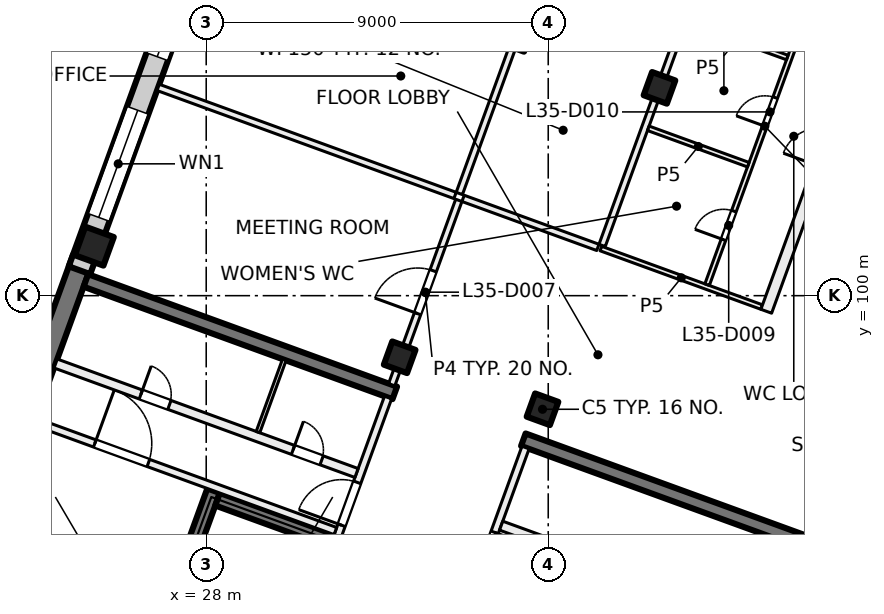
"""IFC4 building model, lengths in metres.
Left out: names, types, materials, properties, quantities, classifications, styles, units other than length and angle.
Written with IfcOpenShell. Run it as: python <this file> out.ifc"""

import sys

from ifc_helpers import new_model, si_unit, direction, frame, frame_2d, origin, origin_2d, place, context, subcontext, project, spatial, rectangle, extrude, element, fill, save


model = new_model("IFC4")
c1 = context("Model", 3, precision=1e-05, world=origin(), true_north=direction((0.0, 1.0)))
c2 = subcontext(c1, "Body", "Model", "MODEL_VIEW")
j1 = project(units=[si_unit("LENGTHUNIT", "METRE"), si_unit("PLANEANGLEUNIT", "RADIAN")], contexts=[c1])
p1 = place(None, origin())
s1 = spatial("IfcSite", under=j1, at=p1, CompositionType="ELEMENT")
p2 = place(p1, origin())
s2 = spatial("IfcBuilding", under=s1, at=p2, CompositionType="ELEMENT")
p3 = place(p2, frame((0.0, 0.0, 150.5)))
s3 = spatial("IfcBuildingStorey", under=s2, at=p3, CompositionType="ELEMENT", Elevation=150.5)
for number, where, z_axis, x_axis in (
    (1, (39.927, 105.468, 0.0), (0.0, 0.0, 1.0), (-0.342, -0.94, 0.0)),
    (2, (36.849, 97.011, 0.0), (0.0, 0.0, 1.0), (-0.342, -0.94, 0.0)),
    (3, (33.091, 98.379, 0.0), (0.0, 0.0, 1.0), (-0.342, -0.94, 0.0)),
):
    element("IfcColumn", number, at=place(p3, frame(where, z_axis=z_axis, x_axis=x_axis)), inside=s3, PredefinedType="COLUMN", context=c2, shape_type="SweptSolid", body=[
        extrude(rectangle(XDim=0.65, YDim=0.65, at=origin_2d()), origin(), (0.0, 0.0, 1.0), 4.0),
    ])
p4 = place(p3, frame((25.056, 101.303, 0.0), z_axis=(0.0, 0.0, 1.0), x_axis=(-0.342020143326, -0.939692620786, 0.0)))
e4 = element("IfcColumn", 4, at=p4, inside=s3, PredefinedType="COLUMN", context=c2, shape_type="SweptSolid", body=[
    extrude(rectangle(XDim=0.8, YDim=0.8, at=origin_2d()), origin(), (0.0, 0.0, 1.0), 4.0),
])
p5 = place(p3, frame((41.85, 85.241, 0.0), z_axis=(0.0, 0.0, 1.0), x_axis=(0.34201902012, 0.939693029598, 0.0)))
e5 = element("IfcWall", 5, at=p5, inside=s3, PredefinedType="SHEAR", context=c2, shape_type="SweptSolid", body=[
    extrude(rectangle(XDim=8.95, YDim=0.55, at=frame_2d((4.475, 0.0))), origin(), (0.0, 0.0, 1.0), 4.0),
])
p6 = place(p3, frame((21.694, 92.577, 0.0), z_axis=(0.0, 0.0, 1.0), x_axis=(0.342010253184, 0.939696220444, 0.0)))
e6 = element("IfcWall", 6, at=p6, inside=s3, PredefinedType="SHEAR", context=c2, shape_type="SweptSolid", body=[
    extrude(rectangle(XDim=8.95, YDim=0.55, at=frame_2d((4.475, 0.0))), origin(), (0.0, 0.0, 1.0), 4.0),
])
p7 = place(p3, frame((27.208, 82.216, 0.0), z_axis=(0.0, 0.0, 1.0), x_axis=(0.34201563943, 0.939694260058, 0.0)))
e7 = element("IfcWall", 7, at=p7, inside=s3, PredefinedType="SHEAR", context=c2, shape_type="SweptSolid", body=[
    extrude(rectangle(XDim=12.225, YDim=0.35, at=frame_2d((6.113, 0.0))), origin(), (0.0, 0.0, 1.0), 4.0),
])
p8 = place(p7, frame((0.7, 0.0, 0.0)))
e8 = element("IfcOpeningElement", 8, at=p8, cuts=e7, PredefinedType="OPENING", context=c2, shape_type="SweptSolid", body=[
    extrude(rectangle(XDim=1.1, YDim=2.1, at=frame_2d((0.55, 1.05))), frame((0.0, 0.185, 0.0), z_axis=(0.0, -1.0, 0.0), x_axis=(1.0, 0.0, 0.0)), (0.0, 0.0, 1.0), 0.37),
])
p9 = place(p7, frame((3.1, 0.0, 0.0)))
e9 = element("IfcOpeningElement", 9, at=p9, cuts=e7, PredefinedType="OPENING", context=c2, shape_type="SweptSolid", body=[
    extrude(rectangle(XDim=1.1, YDim=2.1, at=frame_2d((0.55, 1.05))), frame((0.0, 0.185, 0.0), z_axis=(0.0, -1.0, 0.0), x_axis=(1.0, 0.0, 0.0)), (0.0, 0.0, 1.0), 0.37),
])
p10 = place(p7, frame((5.5, 0.0, 0.0)))
e10 = element("IfcOpeningElement", 10, at=p10, cuts=e7, PredefinedType="OPENING", context=c2, shape_type="SweptSolid", body=[
    extrude(rectangle(XDim=1.1, YDim=2.1, at=frame_2d((0.55, 1.05))), frame((0.0, 0.185, 0.0), z_axis=(0.0, -1.0, 0.0), x_axis=(1.0, 0.0, 0.0)), (0.0, 0.0, 1.0), 0.37),
])
p11 = place(p7, frame((10.3, 0.0, 0.0)))
e11 = element("IfcOpeningElement", 11, at=p11, cuts=e7, PredefinedType="OPENING", context=c2, shape_type="SweptSolid", body=[
    extrude(rectangle(XDim=1.1, YDim=2.1, at=frame_2d((0.55, 1.05))), frame((0.0, 0.185, 0.0), z_axis=(0.0, -1.0, 0.0), x_axis=(1.0, 0.0, 0.0)), (0.0, 0.0, 1.0), 0.37),
])
p12 = place(p3, frame((24.013, 83.379, 0.0), z_axis=(0.0, 0.0, 1.0), x_axis=(0.34201563943, 0.939694260058, 0.0)))
e12 = element("IfcWall", 12, at=p12, inside=s3, PredefinedType="SHEAR", context=c2, shape_type="SweptSolid", body=[
    extrude(rectangle(XDim=12.225, YDim=0.35, at=frame_2d((6.113, 0.0))), origin(), (0.0, 0.0, 1.0), 4.0),
])
p13 = place(p12, frame((7.95, 0.0, 0.0)))
e13 = element("IfcOpeningElement", 13, at=p13, cuts=e12, PredefinedType="OPENING", context=c2, shape_type="SweptSolid", body=[
    extrude(rectangle(XDim=1.1, YDim=2.1, at=frame_2d((0.55, 1.05))), frame((0.0, 0.185, 0.0), z_axis=(0.0, -1.0, 0.0), x_axis=(1.0, 0.0, 0.0)), (0.0, 0.0, 1.0), 0.37),
])
p14 = place(p3, frame((31.165, 93.599, 0.0), z_axis=(0.0, 0.0, 1.0), x_axis=(-0.939683528043, 0.3420451244, 0.0)))
e14 = element("IfcWall", 14, at=p14, inside=s3, PredefinedType="SHEAR", context=c2, shape_type="SweptSolid", body=[
    extrude(rectangle(XDim=3.05, YDim=0.35, at=frame_2d((1.525, 0.0))), origin(), (0.0, 0.0, 1.0), 4.0),
])
p15 = place(p3, frame((44.473, 93.251, 0.0), z_axis=(0.0, 0.0, 1.0), x_axis=(-0.939692847377, 0.34201952077, 0.0)))
e15 = element("IfcWall", 15, at=p15, inside=s3, PredefinedType="SHEAR", context=c2, shape_type="SweptSolid", body=[
    extrude(rectangle(XDim=8.65, YDim=0.35, at=frame_2d((4.325, 0.0))), origin(), (0.0, 0.0, 1.0), 4.0),
])
p16 = place(p3, frame((32.962, 97.441, 0.0), z_axis=(0.0, 0.0, 1.0), x_axis=(-0.939689545667, 0.342028592028, 0.0)))
e16 = element("IfcWall", 16, at=p16, inside=s3, PredefinedType="SHEAR", context=c2, shape_type="SweptSolid", body=[
    extrude(rectangle(XDim=8.65, YDim=0.35, at=frame_2d((4.325, 0.0))), origin(), (0.0, 0.0, 1.0), 4.0),
])
p17 = place(p3, frame((24.666, 100.669, 0.0), z_axis=(0.0, 0.0, 1.0), x_axis=(0.34201964167, 0.939692803373, 0.0)))
e17 = element("IfcWall", 17, at=p17, inside=s3, PredefinedType="SOLIDWALL", context=c2, shape_type="SweptSolid", body=[
    extrude(rectangle(XDim=32.884, YDim=0.6, at=frame_2d((16.442, 0.0))), origin(), (0.0, 0.0, 1.0), 3.625),
])
p18 = place(p17, frame((1.48, 0.0, 0.9)))
e18 = element("IfcOpeningElement", 18, at=p18, cuts=e17, PredefinedType="OPENING", context=c2, shape_type="SweptSolid", body=[
    extrude(rectangle(XDim=3.0, YDim=2.4, at=frame_2d((1.5, 1.2))), frame((0.0, 0.31, 0.0), z_axis=(0.0, -1.0, 0.0), x_axis=(1.0, 0.0, 0.0)), (0.0, 0.0, 1.0), 0.62),
])
p19 = place(p17, frame((5.98, 0.0, 0.9)))
e19 = element("IfcOpeningElement", 19, at=p19, cuts=e17, PredefinedType="OPENING", context=c2, shape_type="SweptSolid", body=[
    extrude(rectangle(XDim=3.0, YDim=2.4, at=frame_2d((1.5, 1.2))), frame((0.0, 0.31, 0.0), z_axis=(0.0, -1.0, 0.0), x_axis=(1.0, 0.0, 0.0)), (0.0, 0.0, 1.0), 0.62),
])
p20 = place(p17, frame((10.48, 0.0, 0.9)))
e20 = element("IfcOpeningElement", 20, at=p20, cuts=e17, PredefinedType="OPENING", context=c2, shape_type="SweptSolid", body=[
    extrude(rectangle(XDim=3.0, YDim=2.4, at=frame_2d((1.5, 1.2))), frame((0.0, 0.31, 0.0), z_axis=(0.0, -1.0, 0.0), x_axis=(1.0, 0.0, 0.0)), (0.0, 0.0, 1.0), 0.62),
])
p21 = place(p17, frame((14.98, 0.0, 0.9)))
e21 = element("IfcOpeningElement", 21, at=p21, cuts=e17, PredefinedType="OPENING", context=c2, shape_type="SweptSolid", body=[
    extrude(rectangle(XDim=3.0, YDim=2.4, at=frame_2d((1.5, 1.2))), frame((0.0, 0.31, 0.0), z_axis=(0.0, -1.0, 0.0), x_axis=(1.0, 0.0, 0.0)), (0.0, 0.0, 1.0), 0.62),
])
p22 = place(p17, frame((19.48, 0.0, 0.9)))
e22 = element("IfcOpeningElement", 22, at=p22, cuts=e17, PredefinedType="OPENING", context=c2, shape_type="SweptSolid", body=[
    extrude(rectangle(XDim=3.0, YDim=2.4, at=frame_2d((1.5, 1.2))), frame((0.0, 0.31, 0.0), z_axis=(0.0, -1.0, 0.0), x_axis=(1.0, 0.0, 0.0)), (0.0, 0.0, 1.0), 0.62),
])
p23 = place(p17, frame((23.98, 0.0, 0.9)))
e23 = element("IfcOpeningElement", 23, at=p23, cuts=e17, PredefinedType="OPENING", context=c2, shape_type="SweptSolid", body=[
    extrude(rectangle(XDim=3.0, YDim=2.4, at=frame_2d((1.5, 1.2))), frame((0.0, 0.31, 0.0), z_axis=(0.0, -1.0, 0.0), x_axis=(1.0, 0.0, 0.0)), (0.0, 0.0, 1.0), 0.62),
])
p24 = place(p17, frame((28.48, 0.0, 0.9)))
e24 = element("IfcOpeningElement", 24, at=p24, cuts=e17, PredefinedType="OPENING", context=c2, shape_type="SweptSolid", body=[
    extrude(rectangle(XDim=3.0, YDim=2.4, at=frame_2d((1.5, 1.2))), frame((0.0, 0.31, 0.0), z_axis=(0.0, -1.0, 0.0), x_axis=(1.0, 0.0, 0.0)), (0.0, 0.0, 1.0), 0.62),
])
p25 = place(p3, frame((31.459, 93.678, 0.0), z_axis=(0.0, 0.0, 1.0), x_axis=(0.341985870128, 0.939705094502, 0.0)))
e25 = element("IfcWall", 25, at=p25, inside=s3, PredefinedType="PARTITIONING", context=c2, shape_type="SweptSolid", body=[
    extrude(rectangle(XDim=3.875, YDim=0.2, at=frame_2d((1.938, 0.0))), origin(), (0.0, 0.0, 1.0), 3.625),
])
p26 = place(p25, frame((0.3, 0.0, 0.0)))
e26 = element("IfcOpeningElement", 26, at=p26, cuts=e25, PredefinedType="OPENING", context=c2, shape_type="SweptSolid", body=[
    extrude(rectangle(XDim=1.2, YDim=2.1, at=frame_2d((0.6, 1.05))), frame((0.0, 0.11, 0.0), z_axis=(0.0, -1.0, 0.0), x_axis=(1.0, 0.0, 0.0)), (0.0, 0.0, 1.0), 0.22),
])
p27 = place(p3, frame((23.483, 96.688, 0.0), z_axis=(0.0, 0.0, 1.0), x_axis=(0.939691007314, -0.342024576271, 0.0)))
e27 = element("IfcWall", 27, at=p27, inside=s3, PredefinedType="PARTITIONING", context=c2, shape_type="SweptSolid", body=[
    extrude(rectangle(XDim=8.425, YDim=0.2, at=frame_2d((4.212, 0.0))), origin(), (0.0, 0.0, 1.0), 3.625),
])
p28 = place(p27, frame((1.688, 0.0, 0.0)))
e28 = element("IfcOpeningElement", 28, at=p28, cuts=e27, PredefinedType="OPENING", context=c2, shape_type="SweptSolid", body=[
    extrude(rectangle(XDim=1.5, YDim=2.1, at=frame_2d((0.75, 1.05))), frame((0.0, 0.11, 0.0), z_axis=(0.0, -1.0, 0.0), x_axis=(1.0, 0.0, 0.0)), (0.0, 0.0, 1.0), 0.22),
])
p29 = place(p3, frame((24.039, 98.215, 0.0), z_axis=(0.0, 0.0, 1.0), x_axis=(0.939687617333, -0.342033889887, 0.0)))
e29 = element("IfcWall", 29, at=p29, inside=s3, PredefinedType="PARTITIONING", context=c2, shape_type="SweptSolid", body=[
    extrude(rectangle(XDim=8.425, YDim=0.25, at=frame_2d((4.212, 0.0))), origin(), (0.0, 0.0, 1.0), 3.625),
])
p30 = place(p29, frame((6.647, 0.0, 0.0)))
e30 = element("IfcOpeningElement", 30, at=p30, cuts=e29, PredefinedType="OPENING", context=c2, shape_type="SweptSolid", body=[
    extrude(rectangle(XDim=0.8, YDim=2.1, at=frame_2d((0.4, 1.05))), frame((0.0, 0.135, 0.0), z_axis=(0.0, -1.0, 0.0), x_axis=(1.0, 0.0, 0.0)), (0.0, 0.0, 1.0), 0.27),
])
p31 = place(p29, frame((2.385, 0.0, 0.0)))
e31 = element("IfcOpeningElement", 31, at=p31, cuts=e29, PredefinedType="OPENING", context=c2, shape_type="SweptSolid", body=[
    extrude(rectangle(XDim=0.8, YDim=2.1, at=frame_2d((0.4, 1.05))), frame((0.0, 0.135, 0.0), z_axis=(0.0, -1.0, 0.0), x_axis=(1.0, 0.0, 0.0)), (0.0, 0.0, 1.0), 0.27),
])
p32 = place(p3, frame((29.362, 96.41, 0.0), z_axis=(0.0, 0.0, 1.0), x_axis=(0.342043138314, 0.939684250976, 0.0)))
e32 = element("IfcWall", 32, at=p32, inside=s3, PredefinedType="PARTITIONING", context=c2, shape_type="SweptSolid", body=[
    extrude(rectangle(XDim=2.025, YDim=0.1, at=frame_2d((1.012, 0.0))), origin(), (0.0, 0.0, 1.0), 3.625),
])
p33 = place(p3, frame((36.403, 96.003, 0.0), z_axis=(0.0, 0.0, 1.0), x_axis=(-0.342041503764, -0.939684845947, 0.0)))
e33 = element("IfcWall", 33, at=p33, inside=s3, PredefinedType="PARTITIONING", context=c2, shape_type="SweptSolid", body=[
    extrude(rectangle(XDim=3.875, YDim=0.2, at=frame_2d((1.938, 0.0))), origin(), (0.0, 0.0, 1.0), 3.625),
])
p34 = place(p33, frame((2.375, 0.0, 0.0)))
e34 = element("IfcOpeningElement", 34, at=p34, cuts=e33, PredefinedType="OPENING", context=c2, shape_type="SweptSolid", body=[
    extrude(rectangle(XDim=1.2, YDim=2.1, at=frame_2d((0.6, 1.05))), frame((0.0, 0.11, 0.0), z_axis=(0.0, -1.0, 0.0), x_axis=(1.0, 0.0, 0.0)), (0.0, 0.0, 1.0), 0.22),
])
p35 = place(p3, frame((35.761, 93.948, 0.0), z_axis=(0.0, 0.0, 1.0), x_axis=(0.93969693093, -0.342008301071, 0.0)))
e35 = element("IfcWall", 35, at=p35, inside=s3, PredefinedType="PARTITIONING", context=c2, shape_type="SweptSolid", body=[
    extrude(rectangle(XDim=8.425, YDim=0.25, at=frame_2d((4.212, 0.0))), origin(), (0.0, 0.0, 1.0), 3.625),
])
p36 = place(p35, frame((3.712, 0.0, 0.0)))
e36 = element("IfcOpeningElement", 36, at=p36, cuts=e35, PredefinedType="OPENING", context=c2, shape_type="SweptSolid", body=[
    extrude(rectangle(XDim=1.0, YDim=2.1, at=frame_2d((0.5, 1.05))), frame((0.0, 0.135, 0.0), z_axis=(0.0, -1.0, 0.0), x_axis=(1.0, 0.0, 0.0)), (0.0, 0.0, 1.0), 0.27),
])
p37 = place(p3, frame((26.736, 105.48, 0.0), z_axis=(0.0, 0.0, 1.0), x_axis=(0.939705074886, -0.341985924028, 0.0)))
e37 = element("IfcWall", 37, at=p37, inside=s3, PredefinedType="PARTITIONING", context=c2, shape_type="SweptSolid", body=[
    extrude(rectangle(XDim=8.313, YDim=0.175, at=frame_2d((4.157, 0.0))), origin(), (0.0, 0.0, 1.0), 3.625),
])
p38 = place(p3, frame((32.881, 97.657, 0.0), z_axis=(0.0, 0.0, 1.0), x_axis=(0.342058204353, 0.939678766832, 0.0)))
e38 = element("IfcWall", 38, at=p38, inside=s3, PredefinedType="PARTITIONING", context=c2, shape_type="SweptSolid", body=[
    extrude(rectangle(XDim=5.163, YDim=0.175, at=frame_2d((2.581, 0.0))), origin(), (0.0, 0.0, 1.0), 3.625),
])
p39 = place(p38, frame((1.991, 0.0, 0.0)))
e39 = element("IfcOpeningElement", 39, at=p39, cuts=e38, PredefinedType="OPENING", context=c2, shape_type="SweptSolid", body=[
    extrude(rectangle(XDim=1.2, YDim=2.1, at=frame_2d((0.6, 1.05))), frame((0.0, 0.097, 0.0), z_axis=(0.0, -1.0, 0.0), x_axis=(1.0, 0.0, 0.0)), (0.0, 0.0, 1.0), 0.195),
])
p40 = place(p3, frame((34.759, 102.56, 0.0), z_axis=(0.0, 0.0, 1.0), x_axis=(0.939770757411, -0.341805388365, 0.0)))
e40 = element("IfcWall", 40, at=p40, inside=s3, PredefinedType="PARTITIONING", context=c2, shape_type="SweptSolid", body=[
    extrude(rectangle(XDim=3.774, YDim=0.175, at=frame_2d((1.887, 0.0))), origin(), (0.0, 0.0, 1.0), 3.625),
])
p41 = place(p3, frame((34.66, 102.689, 0.0), z_axis=(0.0, 0.0, 1.0), x_axis=(0.341951828534, 0.939717482524, 0.0)))
e41 = element("IfcWall", 41, at=p41, inside=s3, PredefinedType="PARTITIONING", context=c2, shape_type="SweptSolid", body=[
    extrude(rectangle(XDim=8.826, YDim=0.175, at=frame_2d((4.413, 0.0))), origin(), (0.0, 0.0, 1.0), 3.625),
])
p42 = place(p41, frame((4.813, 0.0, 0.0)))
e42 = element("IfcOpeningElement", 42, at=p42, cuts=e41, PredefinedType="OPENING", context=c2, shape_type="SweptSolid", body=[
    extrude(rectangle(XDim=1.2, YDim=2.1, at=frame_2d((0.6, 1.05))), frame((0.0, 0.097, 0.0), z_axis=(0.0, -1.0, 0.0), x_axis=(1.0, 0.0, 0.0)), (0.0, 0.0, 1.0), 0.195),
])
p43 = place(p3, frame((38.385, 101.24, 0.0), z_axis=(0.0, 0.0, 1.0), x_axis=(0.939711088937, -0.341969398235, 0.0)))
e43 = element("IfcWall", 43, at=p43, inside=s3, PredefinedType="PARTITIONING", context=c2, shape_type="SweptSolid", body=[
    extrude(rectangle(XDim=4.503, YDim=0.125, at=frame_2d((2.252, 0.0))), origin(), (0.0, 0.0, 1.0), 3.625),
])
p44 = place(p3, frame((38.418, 101.322, 0.0), z_axis=(0.0, 0.0, 1.0), x_axis=(0.342101536507, 0.939662992099, 0.0)))
e44 = element("IfcWall", 44, at=p44, inside=s3, PredefinedType="PARTITIONING", context=c2, shape_type="SweptSolid", body=[
    extrude(rectangle(XDim=8.913, YDim=0.175, at=frame_2d((4.457, 0.0))), origin(), (0.0, 0.0, 1.0), 3.625),
])
p45 = place(p3, frame((41.181, 100.29, 0.0), z_axis=(0.0, 0.0, 1.0), x_axis=(0.34222012082, 0.939619810831, 0.0)))
e45 = element("IfcWall", 45, at=p45, inside=s3, PredefinedType="PARTITIONING", context=c2, shape_type="SweptSolid", body=[
    extrude(rectangle(XDim=8.875, YDim=0.125, at=frame_2d((4.438, 0.0))), origin(), (0.0, 0.0, 1.0), 3.625),
])
p46 = place(p45, frame((1.258, 0.0, 0.0)))
e46 = element("IfcOpeningElement", 46, at=p46, cuts=e45, PredefinedType="OPENING", context=c2, shape_type="SweptSolid", body=[
    extrude(rectangle(XDim=0.8, YDim=2.1, at=frame_2d((0.4, 1.05))), frame((0.0, 0.073, 0.0), z_axis=(0.0, -1.0, 0.0), x_axis=(1.0, 0.0, 0.0)), (0.0, 0.0, 1.0), 0.145),
])
p47 = place(p45, frame((4.437, 0.0, 0.0)))
e47 = element("IfcOpeningElement", 47, at=p47, cuts=e45, PredefinedType="OPENING", context=c2, shape_type="SweptSolid", body=[
    extrude(rectangle(XDim=0.8, YDim=2.1, at=frame_2d((0.4, 1.05))), frame((0.0, 0.073, 0.0), z_axis=(0.0, -1.0, 0.0), x_axis=(1.0, 0.0, 0.0)), (0.0, 0.0, 1.0), 0.145),
])
p48 = place(p45, frame((7.116, 0.0, 0.0)))
e48 = element("IfcOpeningElement", 48, at=p48, cuts=e45, PredefinedType="OPENING", context=c2, shape_type="SweptSolid", body=[
    extrude(rectangle(XDim=1.0, YDim=2.1, at=frame_2d((0.5, 1.05))), frame((0.0, 0.073, 0.0), z_axis=(0.0, -1.0, 0.0), x_axis=(1.0, 0.0, 0.0)), (0.0, 0.0, 1.0), 0.145),
])
p49 = place(p3, frame((42.264, 103.446, 0.0), z_axis=(0.0, 0.0, 1.0), x_axis=(-0.939640574808, 0.342163104635, 0.0)))
e49 = element("IfcWall", 49, at=p49, inside=s3, PredefinedType="PARTITIONING", context=c2, shape_type="SweptSolid", body=[
    extrude(rectangle(XDim=2.8, YDim=0.125, at=frame_2d((1.4, 0.0))), origin(), (0.0, 0.0, 1.0), 3.625),
])
p50 = place(p3, frame((42.737, 99.59, 0.0), z_axis=(0.0, 0.0, 1.0), x_axis=(0.341992703977, 0.939702607438, 0.0)))
e50 = element("IfcWall", 50, at=p50, inside=s3, PredefinedType="PARTITIONING", context=c2, shape_type="SweptSolid", body=[
    extrude(rectangle(XDim=23.006, YDim=0.3, at=frame_2d((11.503, 0.0))), origin(), (0.0, 0.0, 1.0), 3.625),
])
p51 = place(p50, frame((4.062, 0.0, 0.0)))
e51 = element("IfcOpeningElement", 51, at=p51, cuts=e50, PredefinedType="OPENING", context=c2, shape_type="SweptSolid", body=[
    extrude(rectangle(XDim=1.0, YDim=2.1, at=frame_2d((0.5, 1.05))), frame((0.0, 0.16, 0.0), z_axis=(0.0, -1.0, 0.0), x_axis=(1.0, 0.0, 0.0)), (0.0, 0.0, 1.0), 0.32),
])
p52 = place(p50, frame((10.162, 0.0, 0.0)))
e52 = element("IfcOpeningElement", 52, at=p52, cuts=e50, PredefinedType="OPENING", context=c2, shape_type="SweptSolid", body=[
    extrude(rectangle(XDim=0.8, YDim=2.1, at=frame_2d((0.4, 1.05))), frame((0.0, 0.16, 0.0), z_axis=(0.0, -1.0, 0.0), x_axis=(1.0, 0.0, 0.0)), (0.0, 0.0, 1.0), 0.32),
])
p53 = place(p50, frame((13.712, 0.0, 0.0)))
e53 = element("IfcOpeningElement", 53, at=p53, cuts=e50, PredefinedType="OPENING", context=c2, shape_type="SweptSolid", body=[
    extrude(rectangle(XDim=1.2, YDim=2.1, at=frame_2d((0.6, 1.05))), frame((0.0, 0.16, 0.0), z_axis=(0.0, -1.0, 0.0), x_axis=(1.0, 0.0, 0.0)), (0.0, 0.0, 1.0), 0.32),
])
p54 = place(p50, frame((18.662, 0.0, 0.0)))
e54 = element("IfcOpeningElement", 54, at=p54, cuts=e50, PredefinedType="OPENING", context=c2, shape_type="SweptSolid", body=[
    extrude(rectangle(XDim=1.8, YDim=2.1, at=frame_2d((0.9, 1.05))), frame((0.0, 0.16, 0.0), z_axis=(0.0, -1.0, 0.0), x_axis=(1.0, 0.0, 0.0)), (0.0, 0.0, 1.0), 0.32),
])
p55 = place(p3, frame((43.29, 106.266, 0.0), z_axis=(0.0, 0.0, 1.0), x_axis=(-0.939650782256, 0.342135071873, 0.0)))
e55 = element("IfcWall", 55, at=p55, inside=s3, PredefinedType="PARTITIONING", context=c2, shape_type="SweptSolid", body=[
    extrude(rectangle(XDim=2.8, YDim=0.125, at=frame_2d((1.4, 0.0))), origin(), (0.0, 0.0, 1.0), 3.625),
])
p56 = place(p18, origin())
e56 = element("IfcWindow", 56, at=p56, inside=s3, PartitioningType="SINGLE_PANEL", PredefinedType="WINDOW", context=c2, shape_type="SweptSolid", body=[
    extrude(rectangle(XDim=3.0, YDim=2.4, at=frame_2d((1.5, 1.2))), frame((0.0, 0.03, 0.0), z_axis=(0.0, -1.0, 0.0), x_axis=(1.0, 0.0, 0.0)), (0.0, 0.0, 1.0), 0.06),
])
fill(e18, e56)
p57 = place(p19, origin())
e57 = element("IfcWindow", 57, at=p57, inside=s3, PartitioningType="SINGLE_PANEL", PredefinedType="WINDOW", context=c2, shape_type="SweptSolid", body=[
    extrude(rectangle(XDim=3.0, YDim=2.4, at=frame_2d((1.5, 1.2))), frame((0.0, 0.03, 0.0), z_axis=(0.0, -1.0, 0.0), x_axis=(1.0, 0.0, 0.0)), (0.0, 0.0, 1.0), 0.06),
])
fill(e19, e57)
p58 = place(p26, origin())
e58 = element("IfcDoor", 58, at=p58, inside=s3, OperationType="DOUBLE_DOOR_SINGLE_SWING", PredefinedType="DOOR", context=c2, shape_type="SweptSolid", body=[
    extrude(rectangle(XDim=1.2, YDim=2.1, at=frame_2d((0.6, 1.05))), frame((0.0, 0.025, 0.0), z_axis=(0.0, -1.0, 0.0), x_axis=(1.0, 0.0, 0.0)), (0.0, 0.0, 1.0), 0.05),
])
fill(e26, e58)
p59 = place(p28, origin())
e59 = element("IfcDoor", 59, at=p59, inside=s3, OperationType="DOUBLE_DOOR_SINGLE_SWING", PredefinedType="DOOR", context=c2, shape_type="SweptSolid", body=[
    extrude(rectangle(XDim=1.5, YDim=2.1, at=frame_2d((0.75, 1.05))), frame((0.0, 0.025, 0.0), z_axis=(0.0, -1.0, 0.0), x_axis=(1.0, 0.0, 0.0)), (0.0, 0.0, 1.0), 0.05),
])
fill(e28, e59)
p60 = place(p30, origin())
e60 = element("IfcDoor", 60, at=p60, inside=s3, OperationType="SINGLE_SWING_LEFT", PredefinedType="DOOR", context=c2, shape_type="SweptSolid", body=[
    extrude(rectangle(XDim=0.8, YDim=2.1, at=frame_2d((0.4, 1.05))), frame((0.0, 0.025, 0.0), z_axis=(0.0, -1.0, 0.0), x_axis=(1.0, 0.0, 0.0)), (0.0, 0.0, 1.0), 0.05),
])
fill(e30, e60)
p61 = place(p31, origin())
e61 = element("IfcDoor", 61, at=p61, inside=s3, OperationType="SINGLE_SWING_RIGHT", PredefinedType="DOOR", context=c2, shape_type="SweptSolid", body=[
    extrude(rectangle(XDim=0.8, YDim=2.1, at=frame_2d((0.4, 1.05))), frame((0.0, 0.025, 0.0), z_axis=(0.0, -1.0, 0.0), x_axis=(1.0, 0.0, 0.0)), (0.0, 0.0, 1.0), 0.05),
])
fill(e31, e61)
p62 = place(p34, origin())
e62 = element("IfcDoor", 62, at=p62, inside=s3, OperationType="DOUBLE_DOOR_SINGLE_SWING", PredefinedType="DOOR", context=c2, shape_type="SweptSolid", body=[
    extrude(rectangle(XDim=1.2, YDim=2.1, at=frame_2d((0.6, 1.05))), frame((0.0, 0.025, 0.0), z_axis=(0.0, -1.0, 0.0), x_axis=(1.0, 0.0, 0.0)), (0.0, 0.0, 1.0), 0.05),
])
fill(e34, e62)
p63 = place(p39, origin())
e63 = element("IfcDoor", 63, at=p63, inside=s3, OperationType="DOUBLE_DOOR_SINGLE_SWING", PredefinedType="DOOR", context=c2, shape_type="SweptSolid", body=[
    extrude(rectangle(XDim=1.2, YDim=2.1, at=frame_2d((0.6, 1.05))), frame((0.0, 0.025, 0.0), z_axis=(0.0, -1.0, 0.0), x_axis=(1.0, 0.0, 0.0)), (0.0, 0.0, 1.0), 0.05),
])
fill(e39, e63)
p64 = place(p46, origin())
e64 = element("IfcDoor", 64, at=p64, inside=s3, OperationType="SINGLE_SWING_LEFT", PredefinedType="DOOR", context=c2, shape_type="SweptSolid", body=[
    extrude(rectangle(XDim=0.8, YDim=2.1, at=frame_2d((0.4, 1.05))), frame((0.0, 0.025, 0.0), z_axis=(0.0, -1.0, 0.0), x_axis=(1.0, 0.0, 0.0)), (0.0, 0.0, 1.0), 0.05),
])
fill(e46, e64)
p65 = place(p47, origin())
e65 = element("IfcDoor", 65, at=p65, inside=s3, OperationType="SINGLE_SWING_LEFT", PredefinedType="DOOR", context=c2, shape_type="SweptSolid", body=[
    extrude(rectangle(XDim=0.8, YDim=2.1, at=frame_2d((0.4, 1.05))), frame((0.0, 0.025, 0.0), z_axis=(0.0, -1.0, 0.0), x_axis=(1.0, 0.0, 0.0)), (0.0, 0.0, 1.0), 0.05),
])
fill(e47, e65)
save(model, sys.argv[1])
